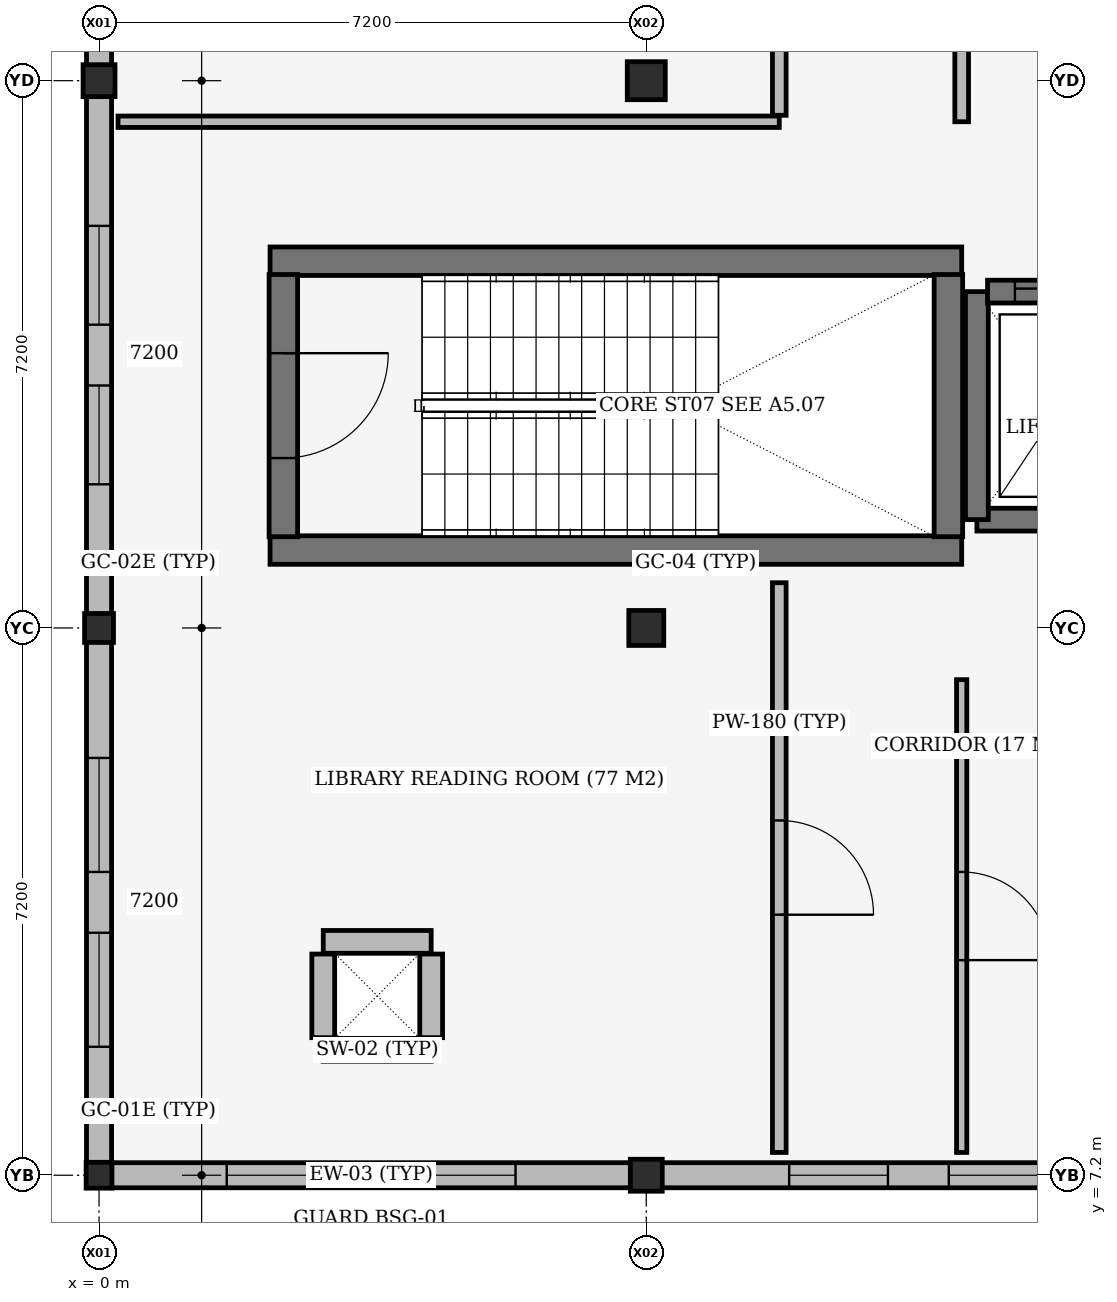
"""IFC4 building model, lengths in metres.
Left out: names, types, materials, properties, quantities, classifications, styles, units other than length and angle.
Written with IfcOpenShell. Run it as: python <this file> out.ifc"""

import sys

from ifc_helpers import new_model, si_unit, direction, frame, frame_2d, origin, origin_2d, place, context, subcontext, project, spatial, rectangle, extrude, element, fill, save


model = new_model("IFC4")
c1 = context("Model", 3, precision=1e-05, world=origin(), true_north=direction((0.0, 1.0)))
c2 = subcontext(c1, "Body", "Model", "MODEL_VIEW")
j1 = project(units=[si_unit("LENGTHUNIT", "METRE"), si_unit("PLANEANGLEUNIT", "RADIAN")], contexts=[c1])
p1 = place(None, origin())
s1 = spatial("IfcSite", under=j1, at=p1, CompositionType="ELEMENT")
p2 = place(p1, origin())
s2 = spatial("IfcBuilding", under=s1, at=p2, CompositionType="ELEMENT")
p3 = place(p2, frame((0.0, 0.0, 18.0)))
s3 = spatial("IfcBuildingStorey", under=s2, at=p3, CompositionType="ELEMENT", Elevation=18.0)
p4 = place(p3, frame((2.95, 8.85, 0.0), z_axis=(0.0, 0.0, 1.0), x_axis=(1.0, 0.0, 0.0)))
e1 = element("IfcWall", 1, at=p4, inside=s3, PredefinedType="SHEAR", context=c2, shape_type="SweptSolid", body=[
    extrude(rectangle(XDim=1.42, YDim=0.3, at=frame_2d((0.71, 0.0))), origin(), (0.0, 0.0, 1.0), 3.96),
])
p5 = place(p3, frame((4.37, 9.01, 0.0), z_axis=(0.0, 0.0, 1.0), x_axis=(0.0, 1.0, 0.0)))
e2 = element("IfcWall", 2, at=p5, inside=s3, PredefinedType="SHEAR", context=c2, shape_type="SweptSolid", body=[
    extrude(rectangle(XDim=1.1, YDim=0.3, at=frame_2d((0.55, 0.0))), origin(), (0.0, 0.0, 1.0), 3.96),
])
p6 = place(p3, frame((4.37, 10.27, 0.0), z_axis=(0.0, 0.0, 1.0), x_axis=(-1.0, 0.0, 0.0)))
e3 = element("IfcWall", 3, at=p6, inside=s3, PredefinedType="SHEAR", context=c2, shape_type="SweptSolid", body=[
    extrude(rectangle(XDim=1.42, YDim=0.3, at=frame_2d((0.71, 0.0))), origin(), (0.0, 0.0, 1.0), 3.96),
])
p7 = place(p3, frame((2.95, 10.11, 0.0), z_axis=(0.0, 0.0, 1.0), x_axis=(0.0, -1.0, 0.0)))
e4 = element("IfcWall", 4, at=p7, inside=s3, PredefinedType="SHEAR", context=c2, shape_type="SweptSolid", body=[
    extrude(rectangle(XDim=1.1, YDim=0.3, at=frame_2d((0.55, 0.0))), origin(), (0.0, 0.0, 1.0), 3.96),
])
p8 = place(p3, frame((0.0, 7.2, 0.0), z_axis=(0.0, 0.0, 1.0), x_axis=(1.0, 0.0, 0.0)))
e5 = element("IfcColumn", 5, at=p8, inside=s3, PredefinedType="COLUMN", context=c2, shape_type="SweptSolid", body=[
    extrude(rectangle(XDim=0.34, YDim=0.34, at=origin_2d()), origin(), (0.0, 0.0, 1.0), 3.935),
])
p9 = place(p3, frame((0.0, 14.4, 0.0), z_axis=(0.0, 0.0, 1.0), x_axis=(1.0, 0.0, 0.0)))
e6 = element("IfcColumn", 6, at=p9, inside=s3, PredefinedType="COLUMN", context=c2, shape_type="SweptSolid", body=[
    extrude(rectangle(XDim=0.38, YDim=0.38, at=origin_2d()), origin(), (0.0, 0.0, 1.0), 3.935),
])
for number, where, z_axis, x_axis in (
    (7, (0.0, 21.6, 0.0), (0.0, 0.0, 1.0), (1.0, 0.0, 0.0)),
    (8, (7.2, 7.2, 0.0), (0.0, 0.0, 1.0), (1.0, 0.0, 0.0)),
):
    element("IfcColumn", number, at=place(p3, frame(where, z_axis=z_axis, x_axis=x_axis)), inside=s3, PredefinedType="COLUMN", context=c2, shape_type="SweptSolid", body=[
        extrude(rectangle(XDim=0.42, YDim=0.42, at=origin_2d()), origin(), (0.0, 0.0, 1.0), 3.935),
    ])
p10 = place(p3, frame((7.2, 14.4, 0.0), z_axis=(0.0, 0.0, 1.0), x_axis=(1.0, 0.0, 0.0)))
e9 = element("IfcColumn", 9, at=p10, inside=s3, PredefinedType="COLUMN", context=c2, shape_type="SweptSolid", body=[
    extrude(rectangle(XDim=0.46, YDim=0.46, at=origin_2d()), origin(), (0.0, 0.0, 1.0), 3.935),
])
p11 = place(p3, frame((7.2, 21.6, 0.0), z_axis=(0.0, 0.0, 1.0), x_axis=(1.0, 0.0, 0.0)))
e10 = element("IfcColumn", 10, at=p11, inside=s3, PredefinedType="COLUMN", context=c2, shape_type="SweptSolid", body=[
    extrude(rectangle(XDim=0.5, YDim=0.5, at=origin_2d()), origin(), (0.0, 0.0, 1.0), 3.935),
])
for number, where, z_axis, x_axis in (
    (11, (2.25, 15.425, 0.0), (0.0, 0.0, 1.0), (1.0, 0.0, 0.0)),
    (12, (11.35, 19.225, 0.0), (0.0, 0.0, 1.0), (-1.0, 0.0, 0.0)),
):
    element("IfcWall", number, at=place(p3, frame(where, z_axis=z_axis, x_axis=x_axis)), inside=s3, PredefinedType="SHEAR", context=c2, shape_type="SweptSolid", body=[
        extrude(rectangle(XDim=9.1, YDim=0.375, at=frame_2d((4.55, 0.0))), origin(), (0.0, 0.0, 1.0), 3.935),
    ])
p12 = place(p3, frame((11.175, 15.6, 0.0), z_axis=(0.0, 0.0, 1.0), x_axis=(0.0, 1.0, 0.0)))
e13 = element("IfcWall", 13, at=p12, inside=s3, PredefinedType="SHEAR", context=c2, shape_type="SweptSolid", body=[
    extrude(rectangle(XDim=3.45, YDim=0.375, at=frame_2d((1.725, 0.0))), origin(), (0.0, 0.0, 1.0), 3.935),
])
p13 = place(p3, frame((11.55, 15.825, 0.0), z_axis=(0.0, 0.0, 1.0), x_axis=(1.0, 0.0, 0.0)))
e14 = element("IfcWall", 14, at=p13, inside=s3, PredefinedType="SHEAR", context=c2, shape_type="SweptSolid", body=[
    extrude(rectangle(XDim=2.2, YDim=0.3, at=frame_2d((1.1, 0.0))), origin(), (0.0, 0.0, 1.0), 3.935),
])
p14 = place(p3, frame((11.55, 18.825, 0.0), z_axis=(0.0, 0.0, 1.0), x_axis=(0.0, -1.0, 0.0)))
e15 = element("IfcWall", 15, at=p14, inside=s3, PredefinedType="SHEAR", context=c2, shape_type="SweptSolid", body=[
    extrude(rectangle(XDim=3.0, YDim=0.3, at=frame_2d((1.5, 0.0))), origin(), (0.0, 0.0, 1.0), 3.935),
])
p15 = place(p3, frame((6.998, 7.2, 0.0), z_axis=(0.0, 0.0, 1.0), x_axis=(-1.0, 0.0, 0.0)))
e16 = element("IfcWall", 16, at=p15, inside=s3, PredefinedType="STANDARD", context=c2, shape_type="SweptSolid", body=[
    extrude(rectangle(XDim=6.836, YDim=0.33, at=frame_2d((3.418, 0.0))), origin(), (0.0, 0.0, 1.0), 3.295),
])
p16 = place(p15, frame((1.518, 0.0, 0.95)))
e17 = element("IfcOpeningElement", 17, at=p16, cuts=e16, PredefinedType="OPENING", context=c2, shape_type="SweptSolid", body=[
    extrude(rectangle(XDim=1.5, YDim=1.8, at=frame_2d((0.75, 0.9))), frame((0.0, 0.175, 0.0), z_axis=(0.0, -1.0, 0.0), x_axis=(1.0, 0.0, 0.0)), (0.0, 0.0, 1.0), 0.35),
])
p17 = place(p15, frame((3.818, 0.0, 0.95)))
e18 = element("IfcOpeningElement", 18, at=p17, cuts=e16, PredefinedType="OPENING", context=c2, shape_type="SweptSolid", body=[
    extrude(rectangle(XDim=1.5, YDim=1.8, at=frame_2d((0.75, 0.9))), frame((0.0, 0.175, 0.0), z_axis=(0.0, -1.0, 0.0), x_axis=(1.0, 0.0, 0.0)), (0.0, 0.0, 1.0), 0.35),
])
p18 = place(p3, frame((14.158, 7.2, 0.0), z_axis=(0.0, 0.0, 1.0), x_axis=(-1.0, 0.0, 0.0)))
e19 = element("IfcWall", 19, at=p18, inside=s3, PredefinedType="STANDARD", context=c2, shape_type="SweptSolid", body=[
    extrude(rectangle(XDim=6.756, YDim=0.33, at=frame_2d((3.378, 0.0))), origin(), (0.0, 0.0, 1.0), 3.255),
])
p19 = place(p18, frame((1.678, 0.0, 0.95)))
e20 = element("IfcOpeningElement", 20, at=p19, cuts=e19, PredefinedType="OPENING", context=c2, shape_type="SweptSolid", body=[
    extrude(rectangle(XDim=1.3, YDim=1.8, at=frame_2d((0.65, 0.9))), frame((0.0, 0.175, 0.0), z_axis=(0.0, -1.0, 0.0), x_axis=(1.0, 0.0, 0.0)), (0.0, 0.0, 1.0), 0.35),
])
p20 = place(p18, frame((3.778, 0.0, 0.95)))
e21 = element("IfcOpeningElement", 21, at=p20, cuts=e19, PredefinedType="OPENING", context=c2, shape_type="SweptSolid", body=[
    extrude(rectangle(XDim=1.3, YDim=1.8, at=frame_2d((0.65, 0.9))), frame((0.0, 0.175, 0.0), z_axis=(0.0, -1.0, 0.0), x_axis=(1.0, 0.0, 0.0)), (0.0, 0.0, 1.0), 0.35),
])
p21 = place(p3, frame((0.0, 7.362, 0.0), z_axis=(0.0, 0.0, 1.0), x_axis=(0.0, 1.0, 0.0)))
e22 = element("IfcWall", 22, at=p21, inside=s3, PredefinedType="STANDARD", context=c2, shape_type="SweptSolid", body=[
    extrude(rectangle(XDim=6.856, YDim=0.33, at=frame_2d((3.428, 0.0))), origin(), (0.0, 0.0, 1.0), 3.355),
])
p22 = place(p21, frame((1.528, 0.0, 0.95)))
e23 = element("IfcOpeningElement", 23, at=p22, cuts=e22, PredefinedType="OPENING", context=c2, shape_type="SweptSolid", body=[
    extrude(rectangle(XDim=1.5, YDim=1.8, at=frame_2d((0.75, 0.9))), frame((0.0, 0.175, 0.0), z_axis=(0.0, -1.0, 0.0), x_axis=(1.0, 0.0, 0.0)), (0.0, 0.0, 1.0), 0.35),
])
p23 = place(p21, frame((3.828, 0.0, 0.95)))
e24 = element("IfcOpeningElement", 24, at=p23, cuts=e22, PredefinedType="OPENING", context=c2, shape_type="SweptSolid", body=[
    extrude(rectangle(XDim=1.5, YDim=1.8, at=frame_2d((0.75, 0.9))), frame((0.0, 0.175, 0.0), z_axis=(0.0, -1.0, 0.0), x_axis=(1.0, 0.0, 0.0)), (0.0, 0.0, 1.0), 0.35),
])
p24 = place(p3, frame((0.0, 14.582, 0.0), z_axis=(0.0, 0.0, 1.0), x_axis=(0.0, 1.0, 0.0)))
e25 = element("IfcWall", 25, at=p24, inside=s3, PredefinedType="STANDARD", context=c2, shape_type="SweptSolid", body=[
    extrude(rectangle(XDim=6.816, YDim=0.33, at=frame_2d((3.408, 0.0))), origin(), (0.0, 0.0, 1.0), 3.295),
])
p25 = place(p24, frame((1.708, 0.0, 0.95)))
e26 = element("IfcOpeningElement", 26, at=p25, cuts=e25, PredefinedType="OPENING", context=c2, shape_type="SweptSolid", body=[
    extrude(rectangle(XDim=1.3, YDim=1.8, at=frame_2d((0.65, 0.9))), frame((0.0, 0.175, 0.0), z_axis=(0.0, -1.0, 0.0), x_axis=(1.0, 0.0, 0.0)), (0.0, 0.0, 1.0), 0.35),
])
p26 = place(p24, frame((3.808, 0.0, 0.95)))
e27 = element("IfcOpeningElement", 27, at=p26, cuts=e25, PredefinedType="OPENING", context=c2, shape_type="SweptSolid", body=[
    extrude(rectangle(XDim=1.3, YDim=1.8, at=frame_2d((0.65, 0.9))), frame((0.0, 0.175, 0.0), z_axis=(0.0, -1.0, 0.0), x_axis=(1.0, 0.0, 0.0)), (0.0, 0.0, 1.0), 0.35),
])
p27 = place(p3, frame((0.0, 21.802, 0.0), z_axis=(0.0, 0.0, 1.0), x_axis=(0.0, 1.0, 0.0)))
e28 = element("IfcWall", 28, at=p27, inside=s3, PredefinedType="STANDARD", context=c2, shape_type="SweptSolid", body=[
    extrude(rectangle(XDim=6.776, YDim=0.33, at=frame_2d((3.388, 0.0))), origin(), (0.0, 0.0, 1.0), 3.255),
])
p28 = place(p27, frame((1.488, 0.0, 0.95)))
e29 = element("IfcOpeningElement", 29, at=p28, cuts=e28, PredefinedType="OPENING", context=c2, shape_type="SweptSolid", body=[
    extrude(rectangle(XDim=1.5, YDim=1.8, at=frame_2d((0.75, 0.9))), frame((0.0, 0.175, 0.0), z_axis=(0.0, -1.0, 0.0), x_axis=(1.0, 0.0, 0.0)), (0.0, 0.0, 1.0), 0.35),
])
p29 = place(p27, frame((3.788, 0.0, 0.95)))
e30 = element("IfcOpeningElement", 30, at=p29, cuts=e28, PredefinedType="OPENING", context=c2, shape_type="SweptSolid", body=[
    extrude(rectangle(XDim=1.5, YDim=1.8, at=frame_2d((0.75, 0.9))), frame((0.0, 0.175, 0.0), z_axis=(0.0, -1.0, 0.0), x_axis=(1.0, 0.0, 0.0)), (0.0, 0.0, 1.0), 0.35),
])
p30 = place(p3, frame((2.425, 19.05, 0.0), z_axis=(0.0, 0.0, 1.0), x_axis=(0.0, -1.0, 0.0)))
e31 = element("IfcWall", 31, at=p30, inside=s3, PredefinedType="SHEAR", context=c2, shape_type="SweptSolid", body=[
    extrude(rectangle(XDim=3.45, YDim=0.375, at=frame_2d((1.725, 0.0))), origin(), (0.0, 0.0, 1.0), 3.935),
])
p31 = place(p30, frame((1.035, 0.0, 0.0)))
e32 = element("IfcOpeningElement", 32, at=p31, cuts=e31, PredefinedType="OPENING", context=c2, shape_type="SweptSolid", body=[
    extrude(rectangle(XDim=1.38, YDim=2.2, at=frame_2d((0.69, 1.1))), frame((0.0, 0.198, 0.0), z_axis=(0.0, -1.0, 0.0), x_axis=(1.0, 0.0, 0.0)), (0.0, 0.0, 1.0), 0.395),
])
p32 = place(p3, frame((11.69, 18.825, 0.0), z_axis=(0.0, 0.0, 1.0), x_axis=(1.0, 0.0, 0.0)))
e33 = element("IfcWall", 33, at=p32, inside=s3, PredefinedType="SHEAR", context=c2, shape_type="SweptSolid", body=[
    extrude(rectangle(XDim=1.92, YDim=0.3, at=frame_2d((0.96, 0.0))), origin(), (0.0, 0.0, 1.0), 3.935),
])
p33 = place(p32, frame((0.36, 0.0, 0.0)))
e34 = element("IfcOpeningElement", 34, at=p33, cuts=e33, PredefinedType="OPENING", context=c2, shape_type="SweptSolid", body=[
    extrude(rectangle(XDim=1.2, YDim=2.1, at=frame_2d((0.6, 1.05))), frame((0.0, 0.16, 0.0), z_axis=(0.0, -1.0, 0.0), x_axis=(1.0, 0.0, 0.0)), (0.0, 0.0, 1.0), 0.32),
])
p34 = place(p3, frame((8.95, 7.5, 0.0), z_axis=(0.0, 0.0, 1.0), x_axis=(0.0, 1.0, 0.0)))
e35 = element("IfcWall", 35, at=p34, inside=s3, PredefinedType="PARTITIONING", context=c2, shape_type="SweptSolid", body=[
    extrude(rectangle(XDim=7.495, YDim=0.18, at=frame_2d((3.748, 0.0))), origin(), (0.0, 0.0, 1.0), 3.255),
])
p35 = place(p34, frame((3.127, 0.0, 0.0)))
e36 = element("IfcOpeningElement", 36, at=p35, cuts=e35, PredefinedType="OPENING", context=c2, shape_type="SweptSolid", body=[
    extrude(rectangle(XDim=1.24, YDim=2.25, at=frame_2d((0.62, 1.125))), frame((0.0, 0.1, 0.0), z_axis=(0.0, -1.0, 0.0), x_axis=(1.0, 0.0, 0.0)), (0.0, 0.0, 1.0), 0.2),
])
p36 = place(p3, frame((0.25, 21.06, 0.0), z_axis=(0.0, 0.0, 1.0), x_axis=(1.0, 0.0, 0.0)))
e37 = element("IfcWall", 37, at=p36, inside=s3, PredefinedType="PARTITIONING", context=c2, shape_type="SweptSolid", body=[
    extrude(rectangle(XDim=8.7, YDim=0.15, at=frame_2d((4.35, 0.0))), origin(), (0.0, 0.0, 1.0), 3.485),
])
p37 = place(p3, frame((8.95, 21.145, 0.0), z_axis=(0.0, 0.0, 1.0), x_axis=(0.0, 1.0, 0.0)))
e38 = element("IfcWall", 38, at=p37, inside=s3, PredefinedType="PARTITIONING", context=c2, shape_type="SweptSolid", body=[
    extrude(rectangle(XDim=8.955, YDim=0.18, at=frame_2d((4.478, 0.0))), origin(), (0.0, 0.0, 1.0), 3.255),
])
p38 = place(p37, frame((3.867, 0.0, 0.0)))
e39 = element("IfcOpeningElement", 39, at=p38, cuts=e38, PredefinedType="OPENING", context=c2, shape_type="SweptSolid", body=[
    extrude(rectangle(XDim=1.22, YDim=2.25, at=frame_2d((0.61, 1.125))), frame((0.0, 0.1, 0.0), z_axis=(0.0, -1.0, 0.0), x_axis=(1.0, 0.0, 0.0)), (0.0, 0.0, 1.0), 0.2),
])
p39 = place(p3, frame((11.35, 7.5, 0.0), z_axis=(0.0, 0.0, 1.0), x_axis=(0.0, 1.0, 0.0)))
e40 = element("IfcWall", 40, at=p39, inside=s3, PredefinedType="PARTITIONING", context=c2, shape_type="SweptSolid", body=[
    extrude(rectangle(XDim=6.22, YDim=0.135, at=frame_2d((3.11, 0.0))), origin(), (0.0, 0.0, 1.0), 3.935),
])
p40 = place(p39, frame((2.53, 0.0, 0.0)))
e41 = element("IfcOpeningElement", 41, at=p40, cuts=e40, PredefinedType="OPENING", context=c2, shape_type="SweptSolid", body=[
    extrude(rectangle(XDim=1.16, YDim=2.2, at=frame_2d((0.58, 1.1))), frame((0.0, 0.077, 0.0), z_axis=(0.0, -1.0, 0.0), x_axis=(1.0, 0.0, 0.0)), (0.0, 0.0, 1.0), 0.155),
])
p41 = place(p3, frame((11.35, 21.06, 0.0), z_axis=(0.0, 0.0, 1.0), x_axis=(0.0, 1.0, 0.0)))
e42 = element("IfcWall", 42, at=p41, inside=s3, PredefinedType="PARTITIONING", context=c2, shape_type="SweptSolid", body=[
    extrude(rectangle(XDim=9.04, YDim=0.18, at=frame_2d((4.52, 0.0))), origin(), (0.0, 0.0, 1.0), 3.255),
])
p42 = place(p41, frame((3.91, 0.0, 0.0)))
e43 = element("IfcOpeningElement", 43, at=p42, cuts=e42, PredefinedType="OPENING", context=c2, shape_type="SweptSolid", body=[
    extrude(rectangle(XDim=1.22, YDim=2.25, at=frame_2d((0.61, 1.125))), frame((0.0, 0.1, 0.0), z_axis=(0.0, -1.0, 0.0), x_axis=(1.0, 0.0, 0.0)), (0.0, 0.0, 1.0), 0.2),
])
p43 = place(p16, origin())
e44 = element("IfcWindow", 44, at=p43, inside=s3, PartitioningType="DOUBLE_PANEL_VERTICAL", PredefinedType="WINDOW", context=c2, shape_type="SweptSolid", body=[
    extrude(rectangle(XDim=1.5, YDim=1.8, at=frame_2d((0.75, 0.9))), frame((0.0, 0.03, 0.0), z_axis=(0.0, -1.0, 0.0), x_axis=(1.0, 0.0, 0.0)), (0.0, 0.0, 1.0), 0.06),
])
fill(e17, e44)
p44 = place(p17, origin())
e45 = element("IfcWindow", 45, at=p44, inside=s3, PartitioningType="DOUBLE_PANEL_VERTICAL", PredefinedType="WINDOW", context=c2, shape_type="SweptSolid", body=[
    extrude(rectangle(XDim=1.5, YDim=1.8, at=frame_2d((0.75, 0.9))), frame((0.0, 0.03, 0.0), z_axis=(0.0, -1.0, 0.0), x_axis=(1.0, 0.0, 0.0)), (0.0, 0.0, 1.0), 0.06),
])
fill(e18, e45)
p45 = place(p19, origin())
e46 = element("IfcWindow", 46, at=p45, inside=s3, PartitioningType="DOUBLE_PANEL_VERTICAL", PredefinedType="WINDOW", context=c2, shape_type="SweptSolid", body=[
    extrude(rectangle(XDim=1.3, YDim=1.8, at=frame_2d((0.65, 0.9))), frame((0.0, 0.03, 0.0), z_axis=(0.0, -1.0, 0.0), x_axis=(1.0, 0.0, 0.0)), (0.0, 0.0, 1.0), 0.06),
])
fill(e20, e46)
p46 = place(p20, origin())
e47 = element("IfcWindow", 47, at=p46, inside=s3, PartitioningType="DOUBLE_PANEL_VERTICAL", PredefinedType="WINDOW", context=c2, shape_type="SweptSolid", body=[
    extrude(rectangle(XDim=1.3, YDim=1.8, at=frame_2d((0.65, 0.9))), frame((0.0, 0.03, 0.0), z_axis=(0.0, -1.0, 0.0), x_axis=(1.0, 0.0, 0.0)), (0.0, 0.0, 1.0), 0.06),
])
fill(e21, e47)
p47 = place(p22, origin())
e48 = element("IfcWindow", 48, at=p47, inside=s3, PartitioningType="DOUBLE_PANEL_VERTICAL", PredefinedType="WINDOW", context=c2, shape_type="SweptSolid", body=[
    extrude(rectangle(XDim=1.5, YDim=1.8, at=frame_2d((0.75, 0.9))), frame((0.0, 0.03, 0.0), z_axis=(0.0, -1.0, 0.0), x_axis=(1.0, 0.0, 0.0)), (0.0, 0.0, 1.0), 0.06),
])
fill(e23, e48)
p48 = place(p23, origin())
e49 = element("IfcWindow", 49, at=p48, inside=s3, PartitioningType="DOUBLE_PANEL_VERTICAL", PredefinedType="WINDOW", context=c2, shape_type="SweptSolid", body=[
    extrude(rectangle(XDim=1.5, YDim=1.8, at=frame_2d((0.75, 0.9))), frame((0.0, 0.03, 0.0), z_axis=(0.0, -1.0, 0.0), x_axis=(1.0, 0.0, 0.0)), (0.0, 0.0, 1.0), 0.06),
])
fill(e24, e49)
p49 = place(p25, origin())
e50 = element("IfcWindow", 50, at=p49, inside=s3, PartitioningType="DOUBLE_PANEL_VERTICAL", PredefinedType="WINDOW", context=c2, shape_type="SweptSolid", body=[
    extrude(rectangle(XDim=1.3, YDim=1.8, at=frame_2d((0.65, 0.9))), frame((0.0, 0.03, 0.0), z_axis=(0.0, -1.0, 0.0), x_axis=(1.0, 0.0, 0.0)), (0.0, 0.0, 1.0), 0.06),
])
fill(e26, e50)
p50 = place(p26, origin())
e51 = element("IfcWindow", 51, at=p50, inside=s3, PartitioningType="DOUBLE_PANEL_VERTICAL", PredefinedType="WINDOW", context=c2, shape_type="SweptSolid", body=[
    extrude(rectangle(XDim=1.3, YDim=1.8, at=frame_2d((0.65, 0.9))), frame((0.0, 0.03, 0.0), z_axis=(0.0, -1.0, 0.0), x_axis=(1.0, 0.0, 0.0)), (0.0, 0.0, 1.0), 0.06),
])
fill(e27, e51)
p51 = place(p31, origin())
e52 = element("IfcDoor", 52, at=p51, inside=s3, OperationType="DOUBLE_DOOR_SINGLE_SWING", PredefinedType="DOOR", context=c2, shape_type="SweptSolid", body=[
    extrude(rectangle(XDim=1.38, YDim=2.2, at=frame_2d((0.69, 1.1))), frame((0.0, 0.025, 0.0), z_axis=(0.0, -1.0, 0.0), x_axis=(1.0, 0.0, 0.0)), (0.0, 0.0, 1.0), 0.05),
])
fill(e32, e52)
p52 = place(p33, origin())
e53 = element("IfcDoor", 53, at=p52, inside=s3, OperationType="SLIDING_TO_LEFT", PredefinedType="DOOR", context=c2, shape_type="SweptSolid", body=[
    extrude(rectangle(XDim=1.2, YDim=2.1, at=frame_2d((0.6, 1.05))), frame((0.0, 0.025, 0.0), z_axis=(0.0, -1.0, 0.0), x_axis=(1.0, 0.0, 0.0)), (0.0, 0.0, 1.0), 0.05),
])
fill(e34, e53)
p53 = place(p35, origin())
e54 = element("IfcDoor", 54, at=p53, inside=s3, OperationType="SINGLE_SWING_RIGHT", PredefinedType="DOOR", context=c2, shape_type="SweptSolid", body=[
    extrude(rectangle(XDim=1.24, YDim=2.25, at=frame_2d((0.62, 1.125))), frame((0.0, 0.025, 0.0), z_axis=(0.0, -1.0, 0.0), x_axis=(1.0, 0.0, 0.0)), (0.0, 0.0, 1.0), 0.05),
])
fill(e36, e54)
p54 = place(p40, origin())
e55 = element("IfcDoor", 55, at=p54, inside=s3, OperationType="SINGLE_SWING_RIGHT", PredefinedType="DOOR", context=c2, shape_type="SweptSolid", body=[
    extrude(rectangle(XDim=1.16, YDim=2.2, at=frame_2d((0.58, 1.1))), frame((0.0, 0.025, 0.0), z_axis=(0.0, -1.0, 0.0), x_axis=(1.0, 0.0, 0.0)), (0.0, 0.0, 1.0), 0.05),
])
fill(e41, e55)
save(model, sys.argv[1])
